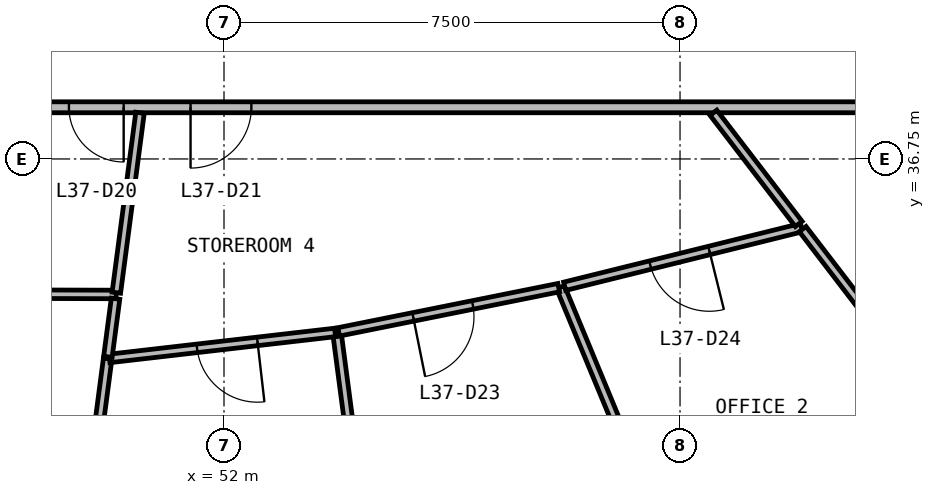
"""IFC4 building model, lengths in metres.
Left out: names, types, materials, properties, quantities, classifications, styles, units other than length and angle.
Written with IfcOpenShell. Run it as: python <this file> out.ifc"""

import sys

from ifc_helpers import new_model, si_unit, direction, frame, frame_2d, origin, place, context, subcontext, project, spatial, rectangle, extrude, source, transform, mapped, element, fill, save


model = new_model("IFC4")
c1 = context("Model", 3, precision=1e-05, world=origin(), true_north=direction((0.0, 1.0)))
c2 = subcontext(c1, "Body", "Model", "MODEL_VIEW")
j1 = project(units=[si_unit("LENGTHUNIT", "METRE"), si_unit("PLANEANGLEUNIT", "RADIAN")], contexts=[c1])
p1 = place(None, origin())
s1 = spatial("IfcSite", under=j1, at=p1, CompositionType="ELEMENT")
p2 = place(p1, origin())
s2 = spatial("IfcBuilding", under=s1, at=p2, CompositionType="ELEMENT")
p3 = place(p2, frame((0.0, 0.0, 156.5)))
s3 = spatial("IfcBuildingStorey", under=s2, at=p3, CompositionType="ELEMENT", Elevation=156.5)
p4 = place(p3, frame((63.4, 37.6, 0.0), z_axis=(0.0, 0.0, 1.0), x_axis=(-1.0, 0.0, 0.0)))
e1 = element("IfcWall", 1, at=p4, inside=s3, PredefinedType="PARTITIONING", context=c2, shape_type="SweptSolid", body=[
    extrude(rectangle(XDim=22.8, YDim=0.18, at=frame_2d((11.4, 0.0))), origin(), (0.0, 0.0, 1.0), 2.88),
])
p5 = place(p4, frame((16.05, 0.0, 0.0)))
e2 = element("IfcOpeningElement", 2, at=p5, cuts=e1, PredefinedType="OPENING", context=c2, shape_type="SweptSolid", body=[
    extrude(rectangle(XDim=0.9, YDim=2.1, at=frame_2d((0.45, 1.05))), frame((0.0, 0.1, 0.0), z_axis=(0.0, -1.0, 0.0), x_axis=(1.0, 0.0, 0.0)), (0.0, 0.0, 1.0), 0.2),
])
p6 = place(p4, frame((13.05, 0.0, 0.0)))
e3 = element("IfcOpeningElement", 3, at=p6, cuts=e1, PredefinedType="OPENING", context=c2, shape_type="SweptSolid", body=[
    extrude(rectangle(XDim=0.9, YDim=2.1, at=frame_2d((0.45, 1.05))), frame((0.0, 0.1, 0.0), z_axis=(0.0, -1.0, 0.0), x_axis=(1.0, 0.0, 0.0)), (0.0, 0.0, 1.0), 0.2),
])
p7 = place(p4, frame((10.95, 0.0, 0.0)))
e4 = element("IfcOpeningElement", 4, at=p7, cuts=e1, PredefinedType="OPENING", context=c2, shape_type="SweptSolid", body=[
    extrude(rectangle(XDim=1.0, YDim=2.1, at=frame_2d((0.5, 1.05))), frame((0.0, 0.1, 0.0), z_axis=(0.0, -1.0, 0.0), x_axis=(1.0, 0.0, 0.0)), (0.0, 0.0, 1.0), 0.2),
])
p8 = place(p4, frame((19.95, 0.0, 0.0)))
e5 = element("IfcOpeningElement", 5, at=p8, cuts=e1, PredefinedType="OPENING", context=c2, shape_type="SweptSolid", body=[
    extrude(rectangle(XDim=1.0, YDim=2.1, at=frame_2d((0.5, 1.05))), frame((0.0, 0.1, 0.0), z_axis=(0.0, -1.0, 0.0), x_axis=(1.0, 0.0, 0.0)), (0.0, 0.0, 1.0), 0.2),
])
p9 = place(p3, frame((49.34, 27.795, 0.0), z_axis=(0.0, 0.0, 1.0), x_axis=(0.13055608231, 0.99144092581, 0.0)))
e6 = element("IfcWall", 6, at=p9, inside=s3, PredefinedType="PARTITIONING", context=c2, shape_type="SweptSolid", body=[
    extrude(rectangle(XDim=5.72, YDim=0.14, at=frame_2d((2.86, 0.0))), origin(), (0.0, 0.0, 1.0), 2.88),
])
p10 = place(p9, frame((2.271, 0.0, 0.0)))
e7 = element("IfcOpeningElement", 7, at=p10, cuts=e6, PredefinedType="OPENING", context=c2, shape_type="SweptSolid", body=[
    extrude(rectangle(XDim=1.0, YDim=2.1, at=frame_2d((0.5, 1.05))), frame((0.0, 0.08, 0.0), z_axis=(0.0, -1.0, 0.0), x_axis=(1.0, 0.0, 0.0)), (0.0, 0.0, 1.0), 0.16),
])
p11 = place(p3, frame((53.856, 33.9, 0.0), z_axis=(0.0, 0.0, 1.0), x_axis=(0.130517737487, -0.991445974424, 0.0)))
e8 = element("IfcWall", 8, at=p11, inside=s3, PredefinedType="PARTITIONING", context=c2, shape_type="SweptSolid", body=[
    extrude(rectangle(XDim=4.994, YDim=0.14, at=frame_2d((2.497, 0.0))), origin(), (0.0, 0.0, 1.0), 2.88),
])
p12 = place(p3, frame((57.534, 34.639, 0.0), z_axis=(0.0, 0.0, 1.0), x_axis=(0.382696163026, -0.923874259196, 0.0)))
e9 = element("IfcWall", 9, at=p12, inside=s3, PredefinedType="PARTITIONING", context=c2, shape_type="SweptSolid", body=[
    extrude(rectangle(XDim=4.112, YDim=0.14, at=frame_2d((2.056, 0.0))), origin(), (0.0, 0.0, 1.0), 2.88),
])
p13 = place(p3, frame((61.499, 35.621, 0.0), z_axis=(0.0, 0.0, 1.0), x_axis=(-0.970705214058, -0.240273567836, 0.0)))
e10 = element("IfcWall", 10, at=p13, inside=s3, PredefinedType="PARTITIONING", context=c2, shape_type="SweptSolid", body=[
    extrude(rectangle(XDim=4.014, YDim=0.14, at=frame_2d((2.007, 0.0))), origin(), (0.0, 0.0, 1.0), 2.88),
])
p14 = place(p13, frame((1.563, 0.0, 0.0)))
e11 = element("IfcOpeningElement", 11, at=p14, cuts=e10, PredefinedType="OPENING", context=c2, shape_type="SweptSolid", body=[
    extrude(rectangle(XDim=1.0, YDim=2.1, at=frame_2d((0.5, 1.05))), frame((0.0, 0.08, 0.0), z_axis=(0.0, -1.0, 0.0), x_axis=(1.0, 0.0, 0.0)), (0.0, 0.0, 1.0), 0.16),
])
p15 = place(p3, frame((46.452, 34.532, 0.0), z_axis=(0.0, 0.0, 1.0), x_axis=(0.999995948964, -0.002846411033, 0.0)))
e12 = element("IfcWall", 12, at=p15, inside=s3, PredefinedType="PARTITIONING", context=c2, shape_type="SweptSolid", body=[
    extrude(rectangle(XDim=3.774, YDim=0.14, at=frame_2d((1.887, 0.0))), origin(), (0.0, 0.0, 1.0), 2.88),
])
p16 = place(p3, frame((53.826, 33.897, 0.0), z_axis=(0.0, 0.0, 1.0), x_axis=(-0.993434107381, -0.114405744138, 0.0)))
e13 = element("IfcWall", 13, at=p16, inside=s3, PredefinedType="PARTITIONING", context=c2, shape_type="SweptSolid", body=[
    extrude(rectangle(XDim=3.734, YDim=0.14, at=frame_2d((1.867, 0.0))), origin(), (0.0, 0.0, 1.0), 2.88),
])
p17 = place(p16, frame((1.285, 0.0, 0.0)))
e14 = element("IfcOpeningElement", 14, at=p17, cuts=e13, PredefinedType="OPENING", context=c2, shape_type="SweptSolid", body=[
    extrude(rectangle(XDim=1.0, YDim=2.1, at=frame_2d((0.5, 1.05))), frame((0.0, 0.08, 0.0), z_axis=(0.0, -1.0, 0.0), x_axis=(1.0, 0.0, 0.0)), (0.0, 0.0, 1.0), 0.16),
])
p18 = place(p3, frame((57.505, 34.634, 0.0), z_axis=(0.0, 0.0, 1.0), x_axis=(-0.980399657824, -0.197019062376, 0.0)))
e15 = element("IfcWall", 15, at=p18, inside=s3, PredefinedType="PARTITIONING", context=c2, shape_type="SweptSolid", body=[
    extrude(rectangle(XDim=3.691, YDim=0.14, at=frame_2d((1.846, 0.0))), origin(), (0.0, 0.0, 1.0), 2.88),
])
p19 = place(p18, frame((1.441, 0.0, 0.0)))
e16 = element("IfcOpeningElement", 16, at=p19, cuts=e15, PredefinedType="OPENING", context=c2, shape_type="SweptSolid", body=[
    extrude(rectangle(XDim=1.0, YDim=2.1, at=frame_2d((0.5, 1.05))), frame((0.0, 0.08, 0.0), z_axis=(0.0, -1.0, 0.0), x_axis=(1.0, 0.0, 0.0)), (0.0, 0.0, 1.0), 0.16),
])
p20 = place(p3, frame((50.619, 37.51, 0.0), z_axis=(0.0, 0.0, 1.0), x_axis=(-0.13049684078, -0.991448725122, 0.0)))
e17 = element("IfcWall", 17, at=p20, inside=s3, PredefinedType="PARTITIONING", context=c2, shape_type="SweptSolid", body=[
    extrude(rectangle(XDim=2.984, YDim=0.14, at=frame_2d((1.492, 0.0))), origin(), (0.0, 0.0, 1.0), 2.88),
])
p21 = place(p3, frame((61.517, 35.597, 0.0), z_axis=(0.0, 0.0, 1.0), x_axis=(0.608716333524, -0.793387941238, 0.0)))
e18 = element("IfcWall", 18, at=p21, inside=s3, PredefinedType="PARTITIONING", context=c2, shape_type="SweptSolid", body=[
    extrude(rectangle(XDim=2.825, YDim=0.14, at=frame_2d((1.413, 0.0))), origin(), (0.0, 0.0, 1.0), 2.88),
])
p22 = place(p3, frame((60.049, 37.51, 0.0), z_axis=(0.0, 0.0, 1.0), x_axis=(0.608742818772, -0.793367620081, 0.0)))
e19 = element("IfcWall", 19, at=p22, inside=s3, PredefinedType="PARTITIONING", context=c2, shape_type="SweptSolid", body=[
    extrude(rectangle(XDim=2.305, YDim=0.14, at=frame_2d((1.152, 0.0))), origin(), (0.0, 0.0, 1.0), 2.88),
])
p23 = place(p3, frame((50.216, 34.452, 0.0), z_axis=(0.0, 0.0, 1.0), x_axis=(-0.130454512571, -0.991454295543, 0.0)))
e20 = element("IfcWall", 20, at=p23, inside=s3, PredefinedType="PARTITIONING", context=c2, shape_type="SweptSolid", body=[
    extrude(rectangle(XDim=0.964, YDim=0.14, at=frame_2d((0.482, 0.0))), origin(), (0.0, 0.0, 1.0), 2.88),
])
m1 = source(origin(), c2, "Body", "SweptSolid", [
    extrude(rectangle(XDim=0.9, YDim=2.1, at=frame_2d((0.45, 1.05))), frame((0.0, 0.025, 0.0), z_axis=(0.0, -1.0, 0.0), x_axis=(1.0, 0.0, 0.0)), (0.0, 0.0, 1.0), 0.05),
])
p24 = place(p6, origin())
e21 = element("IfcDoor", 21, at=p24, inside=s3, OperationType="SINGLE_SWING_LEFT", PredefinedType="DOOR", context=c2, shape_type="MappedRepresentation", body=[
    mapped(m1, transform((0.0, 0.0, 0.0), scale=1.0)),
])
fill(e3, e21)
m2 = source(origin(), c2, "Body", "SweptSolid", [
    extrude(rectangle(XDim=1.0, YDim=2.1, at=frame_2d((0.5, 1.05))), frame((0.0, 0.025, 0.0), z_axis=(0.0, -1.0, 0.0), x_axis=(1.0, 0.0, 0.0)), (0.0, 0.0, 1.0), 0.05),
])
p25 = place(p7, origin())
e22 = element("IfcDoor", 22, at=p25, inside=s3, OperationType="SINGLE_SWING_RIGHT", PredefinedType="DOOR", context=c2, shape_type="MappedRepresentation", body=[
    mapped(m2, transform((0.0, 0.0, 0.0), scale=1.0)),
])
fill(e4, e22)
p26 = place(p17, origin())
e23 = element("IfcDoor", 23, at=p26, inside=s3, OperationType="SINGLE_SWING_LEFT", PredefinedType="DOOR", context=c2, shape_type="MappedRepresentation", body=[
    mapped(m2, transform((0.0, 0.0, 0.0), scale=1.0)),
])
fill(e14, e23)
p27 = place(p19, origin())
e24 = element("IfcDoor", 24, at=p27, inside=s3, OperationType="SINGLE_SWING_RIGHT", PredefinedType="DOOR", context=c2, shape_type="MappedRepresentation", body=[
    mapped(m2, transform((0.0, 0.0, 0.0), scale=1.0)),
])
fill(e16, e24)
p28 = place(p14, origin())
e25 = element("IfcDoor", 25, at=p28, inside=s3, OperationType="SINGLE_SWING_LEFT", PredefinedType="DOOR", context=c2, shape_type="MappedRepresentation", body=[
    mapped(m2, transform((0.0, 0.0, 0.0), scale=1.0)),
])
fill(e11, e25)
save(model, sys.argv[1])
